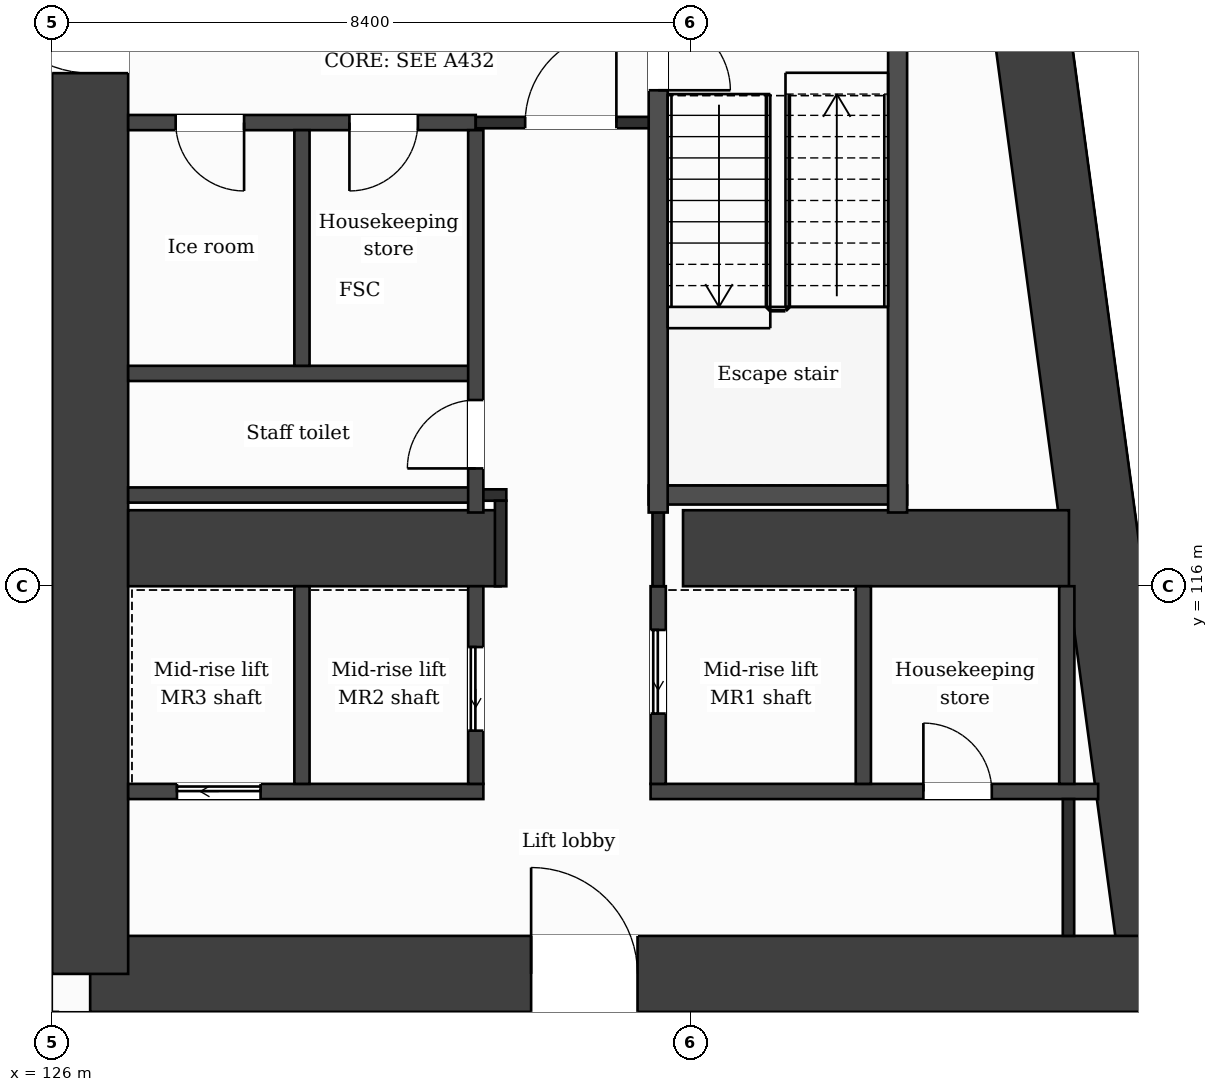
"""IFC4 building model, lengths in metres.
Left out: names, types, materials, properties, quantities, classifications, styles, units other than length and angle.
Written with IfcOpenShell. Run it as: python <this file> out.ifc"""

import sys

from ifc_helpers import new_model, si_unit, direction, frame, frame_2d, origin, place, context, subcontext, project, spatial, rectangle, extrude, element, fill, save


model = new_model("IFC4")
c1 = context("Model", 3, precision=1e-05, world=origin(), true_north=direction((0.0, 1.0)))
c2 = subcontext(c1, "Body", "Model", "MODEL_VIEW")
j1 = project(units=[si_unit("LENGTHUNIT", "METRE"), si_unit("PLANEANGLEUNIT", "RADIAN")], contexts=[c1])
p1 = place(None, origin())
s1 = spatial("IfcSite", under=j1, at=p1, CompositionType="ELEMENT")
p2 = place(p1, origin())
s2 = spatial("IfcBuilding", under=s1, at=p2, CompositionType="ELEMENT")
p3 = place(p2, frame((0.0, 0.0, 131.7)))
s3 = spatial("IfcBuildingStorey", under=s2, at=p3, CompositionType="ELEMENT", Elevation=131.7)
p4 = place(p3, frame((137.732, 131.9, 0.0), z_axis=(0.0, 0.0, 1.0), x_axis=(0.133411141623, -0.991060778808, 0.0)))
e1 = element("IfcWall", 1, at=p4, inside=s3, PredefinedType="SHEAR", context=c2, shape_type="SweptSolid", body=[
    extrude(rectangle(XDim=21.189, YDim=1.0, at=frame_2d((10.595, 0.0))), origin(), (0.0, 0.0, 1.0), 3.7),
])
p5 = place(p3, frame((140.559, 110.9, 0.0), z_axis=(0.0, 0.0, 1.0), x_axis=(-1.0, 0.0, 0.0)))
e2 = element("IfcWall", 2, at=p5, inside=s3, PredefinedType="SHEAR", context=c2, shape_type="SweptSolid", body=[
    extrude(rectangle(XDim=14.059, YDim=1.0, at=frame_2d((7.029, 0.0))), origin(), (0.0, 0.0, 1.0), 3.7),
])
p6 = place(p5, frame((6.858, 0.0, 0.0)))
e3 = element("IfcOpeningElement", 3, at=p6, cuts=e2, PredefinedType="OPENING", context=c2, shape_type="SweptSolid", body=[
    extrude(rectangle(XDim=1.4, YDim=2.1, at=frame_2d((0.7, 1.05))), frame((0.0, 0.51, 0.0), z_axis=(0.0, -1.0, 0.0), x_axis=(1.0, 0.0, 0.0)), (0.0, 0.0, 1.0), 1.02),
])
p7 = place(p3, frame((126.5, 110.9, 0.0), z_axis=(0.0, 0.0, 1.0), x_axis=(0.0, 1.0, 0.0)))
e4 = element("IfcWall", 4, at=p7, inside=s3, PredefinedType="SHEAR", context=c2, shape_type="SweptSolid", body=[
    extrude(rectangle(XDim=21.0, YDim=1.0, at=frame_2d((10.5, 0.0))), origin(), (0.0, 0.0, 1.0), 3.7),
])
p8 = place(p7, frame((11.85, 0.0, 0.0)))
e5 = element("IfcOpeningElement", 5, at=p8, cuts=e4, PredefinedType="OPENING", context=c2, shape_type="SweptSolid", body=[
    extrude(rectangle(XDim=1.4, YDim=2.1, at=frame_2d((0.7, 1.05))), frame((0.0, 0.51, 0.0), z_axis=(0.0, -1.0, 0.0), x_axis=(1.0, 0.0, 0.0)), (0.0, 0.0, 1.0), 1.02),
])
p9 = place(p3, frame((127.0, 116.5, 0.0), z_axis=(0.0, 0.0, 1.0), x_axis=(1.0, 0.0, 0.0)))
e6 = element("IfcWall", 6, at=p9, inside=s3, PredefinedType="SHEAR", context=c2, shape_type="SweptSolid", body=[
    extrude(rectangle(XDim=4.9, YDim=1.0, at=frame_2d((2.45, 0.0))), origin(), (0.0, 0.0, 1.0), 3.7),
])
p10 = place(p3, frame((134.3, 116.5, 0.0), z_axis=(0.0, 0.0, 1.0), x_axis=(1.0, 0.0, 0.0)))
e7 = element("IfcWall", 7, at=p10, inside=s3, PredefinedType="SHEAR", context=c2, shape_type="SweptSolid", body=[
    extrude(rectangle(XDim=5.077, YDim=1.0, at=frame_2d((2.539, 0.0))), origin(), (0.0, 0.0, 1.0), 3.7),
])
p11 = place(p3, frame((140.348, 103.85, 0.0), z_axis=(0.0, 0.0, 1.0), x_axis=(-0.133431549479, 0.991058031401, 0.0)))
e8 = element("IfcWall", 8, at=p11, inside=s3, PredefinedType="SOLIDWALL", context=c2, shape_type="SweptSolid", body=[
    extrude(rectangle(XDim=6.609, YDim=0.3, at=frame_2d((3.304, 0.0))), origin(), (0.0, 0.0, 1.0), 3.2),
])
p12 = place(p11, frame((0.737, 0.0, 0.9)))
e9 = element("IfcOpeningElement", 9, at=p12, cuts=e8, PredefinedType="OPENING", context=c2, shape_type="SweptSolid", body=[
    extrude(rectangle(XDim=1.2, YDim=2.1, at=frame_2d((0.6, 1.05))), frame((0.0, 0.16, 0.0), z_axis=(0.0, -1.0, 0.0), x_axis=(1.0, 0.0, 0.0)), (0.0, 0.0, 1.0), 0.32),
])
p13 = place(p11, frame((3.991, 0.0, 0.0)))
e10 = element("IfcOpeningElement", 10, at=p13, cuts=e8, PredefinedType="OPENING", context=c2, shape_type="SweptSolid", body=[
    extrude(rectangle(XDim=1.2, YDim=2.4, at=frame_2d((0.6, 1.2))), frame((0.0, 0.16, 0.0), z_axis=(0.0, -1.0, 0.0), x_axis=(1.0, 0.0, 0.0)), (0.0, 0.0, 1.0), 0.32),
])
p14 = place(p3, frame((127.0, 113.3, 0.0), z_axis=(0.0, 0.0, 1.0), x_axis=(1.0, 0.0, 0.0)))
e11 = element("IfcWall", 11, at=p14, inside=s3, PredefinedType="PARTITIONING", context=c2, shape_type="SweptSolid", body=[
    extrude(rectangle(XDim=4.673, YDim=0.2, at=frame_2d((2.336, 0.0))), origin(), (0.0, 0.0, 1.0), 3.2),
])
p15 = place(p14, frame((0.642, 0.0, 0.0)))
e12 = element("IfcOpeningElement", 12, at=p15, cuts=e11, PredefinedType="OPENING", context=c2, shape_type="SweptSolid", body=[
    extrude(rectangle(XDim=1.1, YDim=2.1, at=frame_2d((0.55, 1.05))), frame((0.0, 0.11, 0.0), z_axis=(0.0, -1.0, 0.0), x_axis=(1.0, 0.0, 0.0)), (0.0, 0.0, 1.0), 0.22),
])
p16 = place(p3, frame((133.873, 113.3, 0.0), z_axis=(0.0, 0.0, 1.0), x_axis=(1.0, 0.0, 0.0)))
e13 = element("IfcWall", 13, at=p16, inside=s3, PredefinedType="PARTITIONING", context=c2, shape_type="SweptSolid", body=[
    extrude(rectangle(XDim=5.888, YDim=0.2, at=frame_2d((2.944, 0.0))), origin(), (0.0, 0.0, 1.0), 3.2),
])
p17 = place(p16, frame((3.589, 0.0, 0.0)))
e14 = element("IfcOpeningElement", 14, at=p17, cuts=e13, PredefinedType="OPENING", context=c2, shape_type="SweptSolid", body=[
    extrude(rectangle(XDim=0.9, YDim=2.1, at=frame_2d((0.45, 1.05))), frame((0.0, 0.11, 0.0), z_axis=(0.0, -1.0, 0.0), x_axis=(1.0, 0.0, 0.0)), (0.0, 0.0, 1.0), 0.22),
])
p18 = place(p3, frame((127.0, 117.2, 0.0), z_axis=(0.0, 0.0, 1.0), x_axis=(1.0, 0.0, 0.0)))
e15 = element("IfcWall", 15, at=p18, inside=s3, PredefinedType="PARTITIONING", context=c2, shape_type="SweptSolid", body=[
    extrude(rectangle(XDim=4.573, YDim=0.2, at=frame_2d((2.287, 0.0))), origin(), (0.0, 0.0, 1.0), 3.2),
])
p19 = place(p3, frame((131.573, 117.2, 0.0), z_axis=(0.0, 0.0, 1.0), x_axis=(1.0, 0.0, 0.0)))
e16 = element("IfcWall", 16, at=p19, inside=s3, PredefinedType="PARTITIONING", context=c2, shape_type="SweptSolid", body=[
    extrude(rectangle(XDim=0.402, YDim=0.15, at=frame_2d((0.201, 0.0))), origin(), (0.0, 0.0, 1.0), 3.2),
])
p20 = place(p3, frame((133.848, 117.2, 0.0), z_axis=(0.0, 0.0, 1.0), x_axis=(1.0, 0.0, 0.0)))
e17 = element("IfcWall", 17, at=p20, inside=s3, PredefinedType="PARTITIONING", context=c2, shape_type="SweptSolid", body=[
    extrude(rectangle(XDim=3.4, YDim=0.25, at=frame_2d((1.7, 0.0))), origin(), (0.0, 0.0, 1.0), 3.2),
])
p21 = place(p3, frame((127.0, 118.8, 0.0), z_axis=(0.0, 0.0, 1.0), x_axis=(1.0, 0.0, 0.0)))
e18 = element("IfcWall", 18, at=p21, inside=s3, PredefinedType="PARTITIONING", context=c2, shape_type="SweptSolid", body=[
    extrude(rectangle(XDim=4.573, YDim=0.2, at=frame_2d((2.287, 0.0))), origin(), (0.0, 0.0, 1.0), 3.2),
])
p22 = place(p3, frame((127.0, 122.1, 0.0), z_axis=(0.0, 0.0, 1.0), x_axis=(1.0, 0.0, 0.0)))
e19 = element("IfcWall", 19, at=p22, inside=s3, PredefinedType="PARTITIONING", context=c2, shape_type="SweptSolid", body=[
    extrude(rectangle(XDim=4.573, YDim=0.2, at=frame_2d((2.287, 0.0))), origin(), (0.0, 0.0, 1.0), 3.2),
])
p23 = place(p22, frame((2.911, 0.0, 0.0)))
e20 = element("IfcOpeningElement", 20, at=p23, cuts=e19, PredefinedType="OPENING", context=c2, shape_type="SweptSolid", body=[
    extrude(rectangle(XDim=0.9, YDim=2.1, at=frame_2d((0.45, 1.05))), frame((0.0, 0.11, 0.0), z_axis=(0.0, -1.0, 0.0), x_axis=(1.0, 0.0, 0.0)), (0.0, 0.0, 1.0), 0.22),
])
p24 = place(p22, frame((0.625, 0.0, 0.0)))
e21 = element("IfcOpeningElement", 21, at=p24, cuts=e19, PredefinedType="OPENING", context=c2, shape_type="SweptSolid", body=[
    extrude(rectangle(XDim=0.9, YDim=2.1, at=frame_2d((0.45, 1.05))), frame((0.0, 0.11, 0.0), z_axis=(0.0, -1.0, 0.0), x_axis=(1.0, 0.0, 0.0)), (0.0, 0.0, 1.0), 0.22),
])
p25 = place(p3, frame((131.573, 122.1, 0.0), z_axis=(0.0, 0.0, 1.0), x_axis=(1.0, 0.0, 0.0)))
e22 = element("IfcWall", 22, at=p25, inside=s3, PredefinedType="PARTITIONING", context=c2, shape_type="SweptSolid", body=[
    extrude(rectangle(XDim=2.4, YDim=0.15, at=frame_2d((1.2, 0.0))), origin(), (0.0, 0.0, 1.0), 3.2),
])
p26 = place(p25, frame((0.65, 0.0, 0.0)))
e23 = element("IfcOpeningElement", 23, at=p26, cuts=e22, PredefinedType="OPENING", context=c2, shape_type="SweptSolid", body=[
    extrude(rectangle(XDim=1.2, YDim=2.1, at=frame_2d((0.6, 1.05))), frame((0.0, 0.085, 0.0), z_axis=(0.0, -1.0, 0.0), x_axis=(1.0, 0.0, 0.0)), (0.0, 0.0, 1.0), 0.17),
])
p27 = place(p3, frame((100.8, 122.45, 0.0), z_axis=(0.0, 0.0, 1.0), x_axis=(1.0, 0.0, 0.0)))
e24 = element("IfcWall", 24, at=p27, inside=s3, PredefinedType="PARTITIONING", context=c2, shape_type="SweptSolid", body=[
    extrude(rectangle(XDim=25.2, YDim=0.15, at=frame_2d((12.6, 0.0))), origin(), (0.0, 0.0, 1.0), 3.2),
])
p28 = place(p3, frame((126.0, 109.075, 0.0), z_axis=(0.0, 0.0, 1.0), x_axis=(0.0, 1.0, 0.0)))
e25 = element("IfcWall", 25, at=p28, inside=s3, PredefinedType="PARTITIONING", context=c2, shape_type="SweptSolid", body=[
    extrude(rectangle(XDim=1.325, YDim=0.15, at=frame_2d((0.663, 0.0))), origin(), (0.0, 0.0, 1.0), 3.2),
])
p29 = place(p3, frame((129.287, 113.4, 0.0), z_axis=(0.0, 0.0, 1.0), x_axis=(0.0, 1.0, 0.0)))
e26 = element("IfcWall", 26, at=p29, inside=s3, PredefinedType="PARTITIONING", context=c2, shape_type="SweptSolid", body=[
    extrude(rectangle(XDim=2.6, YDim=0.2, at=frame_2d((1.3, 0.0))), origin(), (0.0, 0.0, 1.0), 3.2),
])
p30 = place(p3, frame((129.287, 118.9, 0.0), z_axis=(0.0, 0.0, 1.0), x_axis=(0.0, 1.0, 0.0)))
e27 = element("IfcWall", 27, at=p30, inside=s3, PredefinedType="PARTITIONING", context=c2, shape_type="SweptSolid", body=[
    extrude(rectangle(XDim=3.1, YDim=0.2, at=frame_2d((1.55, 0.0))), origin(), (0.0, 0.0, 1.0), 3.2),
])
p31 = place(p3, frame((131.573, 113.4, 0.0), z_axis=(0.0, 0.0, 1.0), x_axis=(0.0, 1.0, 0.0)))
e28 = element("IfcWall", 28, at=p31, inside=s3, PredefinedType="PARTITIONING", context=c2, shape_type="SweptSolid", body=[
    extrude(rectangle(XDim=2.6, YDim=0.2, at=frame_2d((1.3, 0.0))), origin(), (0.0, 0.0, 1.0), 3.2),
])
p32 = place(p31, frame((0.7, 0.0, 0.0)))
e29 = element("IfcOpeningElement", 29, at=p32, cuts=e28, PredefinedType="OPENING", context=c2, shape_type="SweptSolid", body=[
    extrude(rectangle(XDim=1.1, YDim=2.1, at=frame_2d((0.55, 1.05))), frame((0.0, 0.11, 0.0), z_axis=(0.0, -1.0, 0.0), x_axis=(1.0, 0.0, 0.0)), (0.0, 0.0, 1.0), 0.22),
])
p33 = place(p3, frame((131.573, 116.97, 0.0), z_axis=(0.0, 0.0, 1.0), x_axis=(0.0, 1.0, 0.0)))
e30 = element("IfcWall", 30, at=p33, inside=s3, PredefinedType="PARTITIONING", context=c2, shape_type="SweptSolid", body=[
    extrude(rectangle(XDim=5.03, YDim=0.2, at=frame_2d((2.515, 0.0))), origin(), (0.0, 0.0, 1.0), 3.2),
])
p34 = place(p33, frame((0.58, 0.0, 0.0)))
e31 = element("IfcOpeningElement", 31, at=p34, cuts=e30, PredefinedType="OPENING", context=c2, shape_type="SweptSolid", body=[
    extrude(rectangle(XDim=0.9, YDim=2.1, at=frame_2d((0.45, 1.05))), frame((0.0, 0.11, 0.0), z_axis=(0.0, -1.0, 0.0), x_axis=(1.0, 0.0, 0.0)), (0.0, 0.0, 1.0), 0.22),
])
p35 = place(p3, frame((131.9, 116.0, 0.0), z_axis=(0.0, 0.0, 1.0), x_axis=(0.0, 1.0, 0.0)))
e32 = element("IfcWall", 32, at=p35, inside=s3, PredefinedType="PARTITIONING", context=c2, shape_type="SweptSolid", body=[
    extrude(rectangle(XDim=1.125, YDim=0.15, at=frame_2d((0.562, 0.0))), origin(), (0.0, 0.0, 1.0), 3.2),
])
p36 = place(p3, frame((133.973, 113.4, 0.0), z_axis=(0.0, 0.0, 1.0), x_axis=(0.0, 1.0, 0.0)))
e33 = element("IfcWall", 33, at=p36, inside=s3, PredefinedType="PARTITIONING", context=c2, shape_type="SweptSolid", body=[
    extrude(rectangle(XDim=2.6, YDim=0.2, at=frame_2d((1.3, 0.0))), origin(), (0.0, 0.0, 1.0), 3.2),
])
p37 = place(p36, frame((0.925, 0.0, 0.0)))
e34 = element("IfcOpeningElement", 34, at=p37, cuts=e33, PredefinedType="OPENING", context=c2, shape_type="SweptSolid", body=[
    extrude(rectangle(XDim=1.1, YDim=2.1, at=frame_2d((0.55, 1.05))), frame((0.0, 0.11, 0.0), z_axis=(0.0, -1.0, 0.0), x_axis=(1.0, 0.0, 0.0)), (0.0, 0.0, 1.0), 0.22),
])
p38 = place(p3, frame((133.973, 116.0, 0.0), z_axis=(0.0, 0.0, 1.0), x_axis=(0.0, 1.0, 0.0)))
e35 = element("IfcWall", 35, at=p38, inside=s3, PredefinedType="PARTITIONING", context=c2, shape_type="SweptSolid", body=[
    extrude(rectangle(XDim=0.97, YDim=0.15, at=frame_2d((0.485, 0.0))), origin(), (0.0, 0.0, 1.0), 3.2),
])
p39 = place(p3, frame((133.973, 116.97, 0.0), z_axis=(0.0, 0.0, 1.0), x_axis=(0.0, 1.0, 0.0)))
e36 = element("IfcWall", 36, at=p39, inside=s3, PredefinedType="PARTITIONING", context=c2, shape_type="SweptSolid", body=[
    extrude(rectangle(XDim=6.855, YDim=0.25, at=frame_2d((3.427, 0.0))), origin(), (0.0, 0.0, 1.0), 3.2),
])
p40 = place(p39, frame((5.555, 0.0, 0.0)))
e37 = element("IfcOpeningElement", 37, at=p40, cuts=e36, PredefinedType="OPENING", context=c2, shape_type="SweptSolid", body=[
    extrude(rectangle(XDim=0.95, YDim=2.1, at=frame_2d((0.475, 1.05))), frame((0.0, 0.135, 0.0), z_axis=(0.0, -1.0, 0.0), x_axis=(1.0, 0.0, 0.0)), (0.0, 0.0, 1.0), 0.27),
])
p41 = place(p3, frame((136.672, 113.4, 0.0), z_axis=(0.0, 0.0, 1.0), x_axis=(0.0, 1.0, 0.0)))
e38 = element("IfcWall", 38, at=p41, inside=s3, PredefinedType="PARTITIONING", context=c2, shape_type="SweptSolid", body=[
    extrude(rectangle(XDim=2.6, YDim=0.2, at=frame_2d((1.3, 0.0))), origin(), (0.0, 0.0, 1.0), 3.2),
])
p42 = place(p3, frame((137.123, 116.97, 0.0), z_axis=(0.0, 0.0, 1.0), x_axis=(0.0, 1.0, 0.0)))
e39 = element("IfcWall", 39, at=p42, inside=s3, PredefinedType="PARTITIONING", context=c2, shape_type="SweptSolid", body=[
    extrude(rectangle(XDim=6.855, YDim=0.25, at=frame_2d((3.427, 0.0))), origin(), (0.0, 0.0, 1.0), 3.2),
])
p43 = place(p3, frame((139.349, 113.4, 0.0), z_axis=(0.0, 0.0, 1.0), x_axis=(0.0, 1.0, 0.0)))
e40 = element("IfcWall", 40, at=p43, inside=s3, PredefinedType="PARTITIONING", context=c2, shape_type="SweptSolid", body=[
    extrude(rectangle(XDim=2.6, YDim=0.2, at=frame_2d((1.3, 0.0))), origin(), (0.0, 0.0, 1.0), 3.2),
])
p44 = place(p3, frame((139.371, 111.4, 0.0), z_axis=(0.0, 0.0, 1.0), x_axis=(0.0, 1.0, 0.0)))
e41 = element("IfcWall", 41, at=p44, inside=s3, PredefinedType="PARTITIONING", context=c2, shape_type="SweptSolid", body=[
    extrude(rectangle(XDim=1.8, YDim=0.15, at=frame_2d((0.9, 0.0))), origin(), (0.0, 0.0, 1.0), 3.2),
])
p45 = place(p26, origin())
e42 = element("IfcDoor", 42, at=p45, inside=s3, OperationType="SINGLE_SWING_RIGHT", PredefinedType="DOOR", context=c2, shape_type="SweptSolid", body=[
    extrude(rectangle(XDim=1.2, YDim=2.1, at=frame_2d((0.6, 1.05))), frame((0.0, 0.025, 0.0), z_axis=(0.0, -1.0, 0.0), x_axis=(1.0, 0.0, 0.0)), (0.0, 0.0, 1.0), 0.05),
])
fill(e23, e42)
p46 = place(p23, origin())
e43 = element("IfcDoor", 43, at=p46, inside=s3, OperationType="SINGLE_SWING_LEFT", PredefinedType="DOOR", context=c2, shape_type="SweptSolid", body=[
    extrude(rectangle(XDim=0.9, YDim=2.1, at=frame_2d((0.45, 1.05))), frame((0.0, 0.025, 0.0), z_axis=(0.0, -1.0, 0.0), x_axis=(1.0, 0.0, 0.0)), (0.0, 0.0, 1.0), 0.05),
])
fill(e20, e43)
p47 = place(p24, origin())
e44 = element("IfcDoor", 44, at=p47, inside=s3, OperationType="SINGLE_SWING_RIGHT", PredefinedType="DOOR", context=c2, shape_type="SweptSolid", body=[
    extrude(rectangle(XDim=0.9, YDim=2.1, at=frame_2d((0.45, 1.05))), frame((0.0, 0.025, 0.0), z_axis=(0.0, -1.0, 0.0), x_axis=(1.0, 0.0, 0.0)), (0.0, 0.0, 1.0), 0.05),
])
fill(e21, e44)
p48 = place(p40, origin())
e45 = element("IfcDoor", 45, at=p48, inside=s3, OperationType="SINGLE_SWING_LEFT", PredefinedType="DOOR", context=c2, shape_type="SweptSolid", body=[
    extrude(rectangle(XDim=0.95, YDim=2.1, at=frame_2d((0.475, 1.05))), frame((0.0, 0.025, 0.0), z_axis=(0.0, -1.0, 0.0), x_axis=(1.0, 0.0, 0.0)), (0.0, 0.0, 1.0), 0.05),
])
fill(e37, e45)
p49 = place(p34, origin())
e46 = element("IfcDoor", 46, at=p49, inside=s3, OperationType="SINGLE_SWING_LEFT", PredefinedType="DOOR", context=c2, shape_type="SweptSolid", body=[
    extrude(rectangle(XDim=0.9, YDim=2.1, at=frame_2d((0.45, 1.05))), frame((0.0, 0.025, 0.0), z_axis=(0.0, -1.0, 0.0), x_axis=(1.0, 0.0, 0.0)), (0.0, 0.0, 1.0), 0.05),
])
fill(e31, e46)
p50 = place(p37, origin())
e47 = element("IfcDoor", 47, at=p50, inside=s3, OperationType="SLIDING_TO_LEFT", PredefinedType="DOOR", context=c2, shape_type="SweptSolid", body=[
    extrude(rectangle(XDim=1.1, YDim=2.1, at=frame_2d((0.55, 1.05))), frame((0.0, 0.025, 0.0), z_axis=(0.0, -1.0, 0.0), x_axis=(1.0, 0.0, 0.0)), (0.0, 0.0, 1.0), 0.05),
])
fill(e34, e47)
p51 = place(p32, origin())
e48 = element("IfcDoor", 48, at=p51, inside=s3, OperationType="SLIDING_TO_LEFT", PredefinedType="DOOR", context=c2, shape_type="SweptSolid", body=[
    extrude(rectangle(XDim=1.1, YDim=2.1, at=frame_2d((0.55, 1.05))), frame((0.0, 0.025, 0.0), z_axis=(0.0, -1.0, 0.0), x_axis=(1.0, 0.0, 0.0)), (0.0, 0.0, 1.0), 0.05),
])
fill(e29, e48)
p52 = place(p15, origin())
e49 = element("IfcDoor", 49, at=p52, inside=s3, OperationType="SLIDING_TO_LEFT", PredefinedType="DOOR", context=c2, shape_type="SweptSolid", body=[
    extrude(rectangle(XDim=1.1, YDim=2.1, at=frame_2d((0.55, 1.05))), frame((0.0, 0.025, 0.0), z_axis=(0.0, -1.0, 0.0), x_axis=(1.0, 0.0, 0.0)), (0.0, 0.0, 1.0), 0.05),
])
fill(e12, e49)
p53 = place(p17, origin())
e50 = element("IfcDoor", 50, at=p53, inside=s3, OperationType="SINGLE_SWING_LEFT", PredefinedType="DOOR", context=c2, shape_type="SweptSolid", body=[
    extrude(rectangle(XDim=0.9, YDim=2.1, at=frame_2d((0.45, 1.05))), frame((0.0, 0.025, 0.0), z_axis=(0.0, -1.0, 0.0), x_axis=(1.0, 0.0, 0.0)), (0.0, 0.0, 1.0), 0.05),
])
fill(e14, e50)
p54 = place(p6, origin())
e51 = element("IfcDoor", 51, at=p54, inside=s3, OperationType="SINGLE_SWING_RIGHT", PredefinedType="DOOR", context=c2, shape_type="SweptSolid", body=[
    extrude(rectangle(XDim=1.4, YDim=2.1, at=frame_2d((0.7, 1.05))), frame((0.0, 0.025, 0.0), z_axis=(0.0, -1.0, 0.0), x_axis=(1.0, 0.0, 0.0)), (0.0, 0.0, 1.0), 0.05),
])
fill(e3, e51)
p55 = place(p8, origin())
e52 = element("IfcDoor", 52, at=p55, inside=s3, OperationType="SINGLE_SWING_RIGHT", PredefinedType="DOOR", context=c2, shape_type="SweptSolid", body=[
    extrude(rectangle(XDim=1.4, YDim=2.1, at=frame_2d((0.7, 1.05))), frame((0.0, 0.025, 0.0), z_axis=(0.0, -1.0, 0.0), x_axis=(1.0, 0.0, 0.0)), (0.0, 0.0, 1.0), 0.05),
])
fill(e5, e52)
save(model, sys.argv[1])
